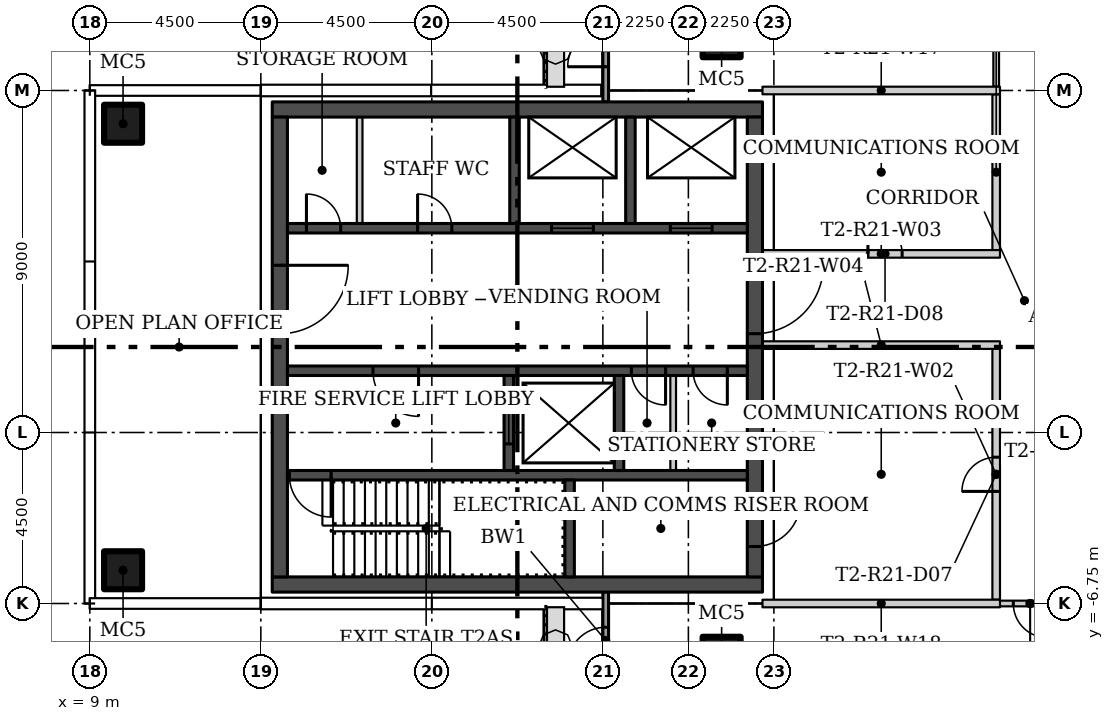
"""IFC4 building model, lengths in metres.
Left out: names, types, materials, properties, quantities, classifications, styles, units other than length and angle.
Written with IfcOpenShell. Run it as: python <this file> out.ifc"""

import sys

from ifc_helpers import new_model, si_unit, direction, frame, frame_2d, origin, origin_2d, place, context, subcontext, project, spatial, rectangle, hollow_rectangle, extrude, element, fill, save


model = new_model("IFC4")
c1 = context("Model", 3, precision=1e-05, world=origin(), true_north=direction((0.0, 1.0)))
c2 = subcontext(c1, "Body", "Model", "MODEL_VIEW")
j1 = project(units=[si_unit("LENGTHUNIT", "METRE"), si_unit("PLANEANGLEUNIT", "RADIAN")], contexts=[c1])
p1 = place(None, origin())
s1 = spatial("IfcSite", under=j1, at=p1, CompositionType="ELEMENT")
p2 = place(p1, origin())
s2 = spatial("IfcBuilding", under=s1, at=p2, CompositionType="ELEMENT")
p3 = place(p2, frame((0.0, 0.0, 194.4)))
s3 = spatial("IfcBuildingStorey", under=s2, at=p3, CompositionType="ELEMENT", Elevation=194.4)
for number, where in (
    (1, (25.625, 8.125, 0.0)),
    (2, (25.625, -8.125, 0.0)),
    (3, (9.875, -5.875, 0.0)),
    (4, (9.875, 5.875, 0.0)),
):
    element("IfcColumn", number, at=place(p3, frame(where)), inside=s3, PredefinedType="COLUMN", context=c2, shape_type="SweptSolid", body=[
        extrude(hollow_rectangle(XDim=1.0, YDim=1.0, WallThickness=0.04, at=origin_2d()), origin(), (0.0, 0.0, 1.0), 3.55),
    ])
p4 = place(p3, frame((32.85, 2.55, 0.0), z_axis=(0.0, 0.0, 1.0), x_axis=(0.0, 1.0, 0.0)))
e5 = element("IfcWall", 5, at=p4, inside=s3, PredefinedType="PARTITIONING", context=c2, shape_type="SweptSolid", body=[
    extrude(rectangle(XDim=4.1, YDim=0.2, at=frame_2d((2.05, 0.0))), origin(), (0.0, 0.0, 1.0), 3.55),
])
p5 = place(p3, frame((32.85, -6.65, 0.0), z_axis=(0.0, 0.0, 1.0), x_axis=(0.0, 1.0, 0.0)))
e6 = element("IfcWall", 6, at=p5, inside=s3, PredefinedType="PARTITIONING", context=c2, shape_type="SweptSolid", body=[
    extrude(rectangle(XDim=6.6, YDim=0.2, at=frame_2d((3.3, 0.0))), origin(), (0.0, 0.0, 1.0), 3.55),
])
p6 = place(p5, frame((2.85, 0.0, 0.0)))
e7 = element("IfcOpeningElement", 7, at=p6, cuts=e6, PredefinedType="OPENING", context=c2, shape_type="SweptSolid", body=[
    extrude(rectangle(XDim=0.9, YDim=2.1, at=frame_2d((0.45, 1.05))), frame((0.0, 0.11, 0.0), z_axis=(0.0, -1.0, 0.0), x_axis=(1.0, 0.0, 0.0)), (0.0, 0.0, 1.0), 0.22),
])
p7 = place(p3, frame((26.7, 2.45, 0.0)))
e8 = element("IfcWall", 8, at=p7, inside=s3, PredefinedType="PARTITIONING", context=c2, shape_type="SweptSolid", body=[
    extrude(rectangle(XDim=6.25, YDim=0.2, at=frame_2d((3.125, 0.0))), origin(), (0.0, 0.0, 1.0), 3.55),
])
p8 = place(p7, frame((2.775, 0.0, 0.0)))
e9 = element("IfcOpeningElement", 9, at=p8, cuts=e8, PredefinedType="OPENING", context=c2, shape_type="SweptSolid", body=[
    extrude(rectangle(XDim=0.9, YDim=2.1, at=frame_2d((0.45, 1.05))), frame((0.0, 0.11, 0.0), z_axis=(0.0, -1.0, 0.0), x_axis=(1.0, 0.0, 0.0)), (0.0, 0.0, 1.0), 0.22),
])
p9 = place(p3, frame((32.95, 0.05, 0.0), z_axis=(0.0, 0.0, 1.0), x_axis=(-1.0, 0.0, 0.0)))
e10 = element("IfcWall", 10, at=p9, inside=s3, PredefinedType="PARTITIONING", context=c2, shape_type="SweptSolid", body=[
    extrude(rectangle(XDim=6.25, YDim=0.2, at=frame_2d((3.125, 0.0))), origin(), (0.0, 0.0, 1.0), 3.55),
])
p10 = place(p3, frame((32.85, 6.85, 0.0), z_axis=(0.0, 0.0, 1.0), x_axis=(0.0, 1.0, 0.0)))
e11 = element("IfcWall", 11, at=p10, inside=s3, PredefinedType="PARTITIONING", context=c2, shape_type="SweptSolid", body=[
    extrude(rectangle(XDim=4.325, YDim=0.15, at=frame_2d((2.163, 0.0))), origin(), (0.0, 0.0, 1.0), 3.55),
])
p11 = place(p10, frame((1.7, 0.0, 0.0)))
e12 = element("IfcOpeningElement", 12, at=p11, cuts=e11, PredefinedType="OPENING", context=c2, shape_type="SweptSolid", body=[
    extrude(rectangle(XDim=0.9, YDim=2.1, at=frame_2d((0.45, 1.05))), frame((0.0, 0.085, 0.0), z_axis=(0.0, -1.0, 0.0), x_axis=(1.0, 0.0, 0.0)), (0.0, 0.0, 1.0), 0.17),
])
p12 = place(p3, frame((34.725, -6.75, 0.0), z_axis=(0.0, 0.0, 1.0), x_axis=(-1.0, 0.0, 0.0)))
e13 = element("IfcWall", 13, at=p12, inside=s3, PredefinedType="PARTITIONING", context=c2, shape_type="SweptSolid", body=[
    extrude(rectangle(XDim=1.976, YDim=0.15, at=frame_2d((0.988, 0.0))), origin(), (0.0, 0.0, 1.0), 3.55),
])
p13 = place(p12, frame((0.525, 0.0, 0.0)))
e14 = element("IfcOpeningElement", 14, at=p13, cuts=e13, PredefinedType="OPENING", context=c2, shape_type="SweptSolid", body=[
    extrude(rectangle(XDim=0.9, YDim=2.1, at=frame_2d((0.45, 1.05))), frame((0.0, 0.085, 0.0), z_axis=(0.0, -1.0, 0.0), x_axis=(1.0, 0.0, 0.0)), (0.0, 0.0, 1.0), 0.17),
])
p14 = place(p3, frame((32.95, 6.75, 0.0), z_axis=(0.0, 0.0, 1.0), x_axis=(-1.0, 0.0, 0.0)))
e15 = element("IfcWall", 15, at=p14, inside=s3, PredefinedType="PARTITIONING", context=c2, shape_type="SweptSolid", body=[
    extrude(rectangle(XDim=6.25, YDim=0.2, at=frame_2d((3.125, 0.0))), origin(), (0.0, 0.0, 1.0), 3.55),
])
p15 = place(p3, frame((26.7, -6.75, 0.0)))
e16 = element("IfcWall", 16, at=p15, inside=s3, PredefinedType="PARTITIONING", context=c2, shape_type="SweptSolid", body=[
    extrude(rectangle(XDim=6.25, YDim=0.2, at=frame_2d((3.125, 0.0))), origin(), (0.0, 0.0, 1.0), 3.55),
])
p16 = place(p3, frame((22.575, 6.448, 0.0), z_axis=(0.0, 0.0, 1.0), x_axis=(0.0, 1.0, 0.0)))
e17 = element("IfcWall", 17, at=p16, inside=s3, PredefinedType="SOLIDWALL", context=c2, shape_type="SweptSolid", body=[
    extrude(rectangle(XDim=2.552, YDim=0.15, at=frame_2d((1.276, 0.0))), origin(), (0.0, 0.0, 1.0), 3.45),
])
p17 = place(p16, frame((0.927, 0.0, 0.0)))
e18 = element("IfcOpeningElement", 18, at=p17, cuts=e17, PredefinedType="OPENING", context=c2, shape_type="SweptSolid", body=[
    extrude(rectangle(XDim=1.0, YDim=2.4, at=frame_2d((0.5, 1.2))), frame((0.0, 0.085, 0.0), z_axis=(0.0, -1.0, 0.0), x_axis=(1.0, 0.0, 0.0)), (0.0, 0.0, 1.0), 0.17),
])
p18 = place(p3, frame((22.575, -9.0, 0.0), z_axis=(0.0, 0.0, 1.0), x_axis=(0.0, 1.0, 0.0)))
e19 = element("IfcWall", 19, at=p18, inside=s3, PredefinedType="SOLIDWALL", context=c2, shape_type="SweptSolid", body=[
    extrude(rectangle(XDim=2.557, YDim=0.15, at=frame_2d((1.278, 0.0))), origin(), (0.0, 0.0, 1.0), 3.45),
])
p19 = place(p18, frame((0.625, 0.0, 0.0)))
e20 = element("IfcOpeningElement", 20, at=p19, cuts=e19, PredefinedType="OPENING", context=c2, shape_type="SweptSolid", body=[
    extrude(rectangle(XDim=1.0, YDim=2.4, at=frame_2d((0.5, 1.2))), frame((0.0, 0.085, 0.0), z_axis=(0.0, -1.0, 0.0), x_axis=(1.0, 0.0, 0.0)), (0.0, 0.0, 1.0), 0.17),
])
for number, where in (
    (21, (13.8, -6.25, 0.0)),
    (22, (13.8, 6.25, 0.0)),
):
    element("IfcWall", number, at=place(p3, frame(where)), inside=s3, PredefinedType="SHEAR", context=c2, shape_type="SweptSolid", body=[
        extrude(rectangle(XDim=12.9, YDim=0.4, at=frame_2d((6.45, 0.0))), origin(), (0.0, 0.0, 1.0), 3.55),
    ])
p20 = place(p3, frame((14.0, 6.05, 0.0), z_axis=(0.0, 0.0, 1.0), x_axis=(0.0, -1.0, 0.0)))
e23 = element("IfcWall", 23, at=p20, inside=s3, PredefinedType="SHEAR", context=c2, shape_type="SweptSolid", body=[
    extrude(rectangle(XDim=12.1, YDim=0.4, at=frame_2d((6.05, 0.0))), origin(), (0.0, 0.0, 1.0), 3.55),
])
p21 = place(p20, frame((3.9, 0.0, 0.0)))
e24 = element("IfcOpeningElement", 24, at=p21, cuts=e23, PredefinedType="OPENING", context=c2, shape_type="SweptSolid", body=[
    extrude(rectangle(XDim=1.8, YDim=2.4, at=frame_2d((0.9, 1.2))), frame((0.0, 0.21, 0.0), z_axis=(0.0, -1.0, 0.0), x_axis=(1.0, 0.0, 0.0)), (0.0, 0.0, 1.0), 0.42),
])
p22 = place(p3, frame((26.5, 6.05, 0.0), z_axis=(0.0, 0.0, 1.0), x_axis=(0.0, -1.0, 0.0)))
e25 = element("IfcWall", 25, at=p22, inside=s3, PredefinedType="SHEAR", context=c2, shape_type="SweptSolid", body=[
    extrude(rectangle(XDim=12.1, YDim=0.4, at=frame_2d((6.05, 0.0))), origin(), (0.0, 0.0, 1.0), 3.55),
])
p23 = place(p22, frame((10.1, 0.0, 0.0)))
e26 = element("IfcOpeningElement", 26, at=p23, cuts=e25, PredefinedType="OPENING", context=c2, shape_type="SweptSolid", body=[
    extrude(rectangle(XDim=1.2, YDim=2.1, at=frame_2d((0.6, 1.05))), frame((0.0, 0.21, 0.0), z_axis=(0.0, -1.0, 0.0), x_axis=(1.0, 0.0, 0.0)), (0.0, 0.0, 1.0), 0.42),
])
p24 = place(p22, frame((3.9, 0.0, 0.0)))
e27 = element("IfcOpeningElement", 27, at=p24, cuts=e25, PredefinedType="OPENING", context=c2, shape_type="SweptSolid", body=[
    extrude(rectangle(XDim=1.8, YDim=2.4, at=frame_2d((0.9, 1.2))), frame((0.0, 0.21, 0.0), z_axis=(0.0, -1.0, 0.0), x_axis=(1.0, 0.0, 0.0)), (0.0, 0.0, 1.0), 0.42),
])
p25 = place(p3, frame((26.3, -3.375, 0.0), z_axis=(0.0, 0.0, 1.0), x_axis=(-1.0, 0.0, 0.0)))
e28 = element("IfcWall", 28, at=p25, inside=s3, PredefinedType="SHEAR", context=c2, shape_type="SweptSolid", body=[
    extrude(rectangle(XDim=12.1, YDim=0.25, at=frame_2d((6.05, 0.0))), origin(), (0.0, 0.0, 1.0), 3.55),
])
p26 = place(p25, frame((10.95, 0.0, 0.0)))
e29 = element("IfcOpeningElement", 29, at=p26, cuts=e28, PredefinedType="OPENING", context=c2, shape_type="SweptSolid", body=[
    extrude(rectangle(XDim=1.1, YDim=2.1, at=frame_2d((0.55, 1.05))), frame((0.0, 0.135, 0.0), z_axis=(0.0, -1.0, 0.0), x_axis=(1.0, 0.0, 0.0)), (0.0, 0.0, 1.0), 0.27),
])
p27 = place(p3, frame((21.625, -6.05, 0.0), z_axis=(0.0, 0.0, 1.0), x_axis=(0.0, 1.0, 0.0)))
e30 = element("IfcWall", 30, at=p27, inside=s3, PredefinedType="SHEAR", context=c2, shape_type="SweptSolid", body=[
    extrude(rectangle(XDim=2.55, YDim=0.25, at=frame_2d((1.275, 0.0))), origin(), (0.0, 0.0, 1.0), 3.55),
])
p28 = place(p3, frame((26.3, -0.625, 0.0), z_axis=(0.0, 0.0, 1.0), x_axis=(-1.0, 0.0, 0.0)))
e31 = element("IfcWall", 31, at=p28, inside=s3, PredefinedType="SHEAR", context=c2, shape_type="SweptSolid", body=[
    extrude(rectangle(XDim=12.1, YDim=0.25, at=frame_2d((6.05, 0.0))), origin(), (0.0, 0.0, 1.0), 3.55),
])
p29 = place(p28, frame((8.65, 0.0, 0.0)))
e32 = element("IfcOpeningElement", 32, at=p29, cuts=e31, PredefinedType="OPENING", context=c2, shape_type="SweptSolid", body=[
    extrude(rectangle(XDim=1.2, YDim=2.1, at=frame_2d((0.6, 1.05))), frame((0.0, 0.135, 0.0), z_axis=(0.0, -1.0, 0.0), x_axis=(1.0, 0.0, 0.0)), (0.0, 0.0, 1.0), 0.27),
])
p30 = place(p28, frame((2.15, 0.0, 0.0)))
e33 = element("IfcOpeningElement", 33, at=p30, cuts=e31, PredefinedType="OPENING", context=c2, shape_type="SweptSolid", body=[
    extrude(rectangle(XDim=0.9, YDim=2.1, at=frame_2d((0.45, 1.05))), frame((0.0, 0.135, 0.0), z_axis=(0.0, -1.0, 0.0), x_axis=(1.0, 0.0, 0.0)), (0.0, 0.0, 1.0), 0.27),
])
p31 = place(p28, frame((0.525, 0.0, 0.0)))
e34 = element("IfcOpeningElement", 34, at=p31, cuts=e31, PredefinedType="OPENING", context=c2, shape_type="SweptSolid", body=[
    extrude(rectangle(XDim=0.9, YDim=2.1, at=frame_2d((0.45, 1.05))), frame((0.0, 0.135, 0.0), z_axis=(0.0, -1.0, 0.0), x_axis=(1.0, 0.0, 0.0)), (0.0, 0.0, 1.0), 0.27),
])
p32 = place(p3, frame((20.025, -3.25, 0.0), z_axis=(0.0, 0.0, 1.0), x_axis=(0.0, 1.0, 0.0)))
e35 = element("IfcWall", 35, at=p32, inside=s3, PredefinedType="SHEAR", context=c2, shape_type="SweptSolid", body=[
    extrude(rectangle(XDim=2.5, YDim=0.25, at=frame_2d((1.25, 0.0))), origin(), (0.0, 0.0, 1.0), 3.55),
])
p33 = place(p32, frame((0.7, 0.0, 0.0)))
e36 = element("IfcOpeningElement", 36, at=p33, cuts=e35, PredefinedType="OPENING", context=c2, shape_type="SweptSolid", body=[
    extrude(rectangle(XDim=1.1, YDim=2.1, at=frame_2d((0.55, 1.05))), frame((0.0, 0.135, 0.0), z_axis=(0.0, -1.0, 0.0), x_axis=(1.0, 0.0, 0.0)), (0.0, 0.0, 1.0), 0.27),
])
p34 = place(p3, frame((22.925, -3.25, 0.0), z_axis=(0.0, 0.0, 1.0), x_axis=(0.0, 1.0, 0.0)))
e37 = element("IfcWall", 37, at=p34, inside=s3, PredefinedType="SHEAR", context=c2, shape_type="SweptSolid", body=[
    extrude(rectangle(XDim=2.5, YDim=0.25, at=frame_2d((1.25, 0.0))), origin(), (0.0, 0.0, 1.0), 3.55),
])
p35 = place(p3, frame((24.35, -3.25, 0.0), z_axis=(0.0, 0.0, 1.0), x_axis=(0.0, 1.0, 0.0)))
e38 = element("IfcWall", 38, at=p35, inside=s3, PredefinedType="PARTITIONING", context=c2, shape_type="SweptSolid", body=[
    extrude(rectangle(XDim=2.5, YDim=0.15, at=frame_2d((1.25, 0.0))), origin(), (0.0, 0.0, 1.0), 3.55),
])
p36 = place(p3, frame((14.2, 3.125, 0.0)))
e39 = element("IfcWall", 39, at=p36, inside=s3, PredefinedType="SHEAR", context=c2, shape_type="SweptSolid", body=[
    extrude(rectangle(XDim=12.1, YDim=0.25, at=frame_2d((6.05, 0.0))), origin(), (0.0, 0.0, 1.0), 3.55),
])
p37 = place(p36, frame((6.95, 0.0, 0.0)))
e40 = element("IfcOpeningElement", 40, at=p37, cuts=e39, PredefinedType="OPENING", context=c2, shape_type="SweptSolid", body=[
    extrude(rectangle(XDim=1.1, YDim=2.1, at=frame_2d((0.55, 1.05))), frame((0.0, 0.135, 0.0), z_axis=(0.0, -1.0, 0.0), x_axis=(1.0, 0.0, 0.0)), (0.0, 0.0, 1.0), 0.27),
])
p38 = place(p36, frame((10.075, 0.0, 0.0)))
e41 = element("IfcOpeningElement", 41, at=p38, cuts=e39, PredefinedType="OPENING", context=c2, shape_type="SweptSolid", body=[
    extrude(rectangle(XDim=1.1, YDim=2.1, at=frame_2d((0.55, 1.05))), frame((0.0, 0.135, 0.0), z_axis=(0.0, -1.0, 0.0), x_axis=(1.0, 0.0, 0.0)), (0.0, 0.0, 1.0), 0.27),
])
p39 = place(p36, frame((0.5, 0.0, 0.0)))
e42 = element("IfcOpeningElement", 42, at=p39, cuts=e39, PredefinedType="OPENING", context=c2, shape_type="SweptSolid", body=[
    extrude(rectangle(XDim=0.9, YDim=2.1, at=frame_2d((0.45, 1.05))), frame((0.0, 0.135, 0.0), z_axis=(0.0, -1.0, 0.0), x_axis=(1.0, 0.0, 0.0)), (0.0, 0.0, 1.0), 0.27),
])
p40 = place(p36, frame((3.425, 0.0, 0.0)))
e43 = element("IfcOpeningElement", 43, at=p40, cuts=e39, PredefinedType="OPENING", context=c2, shape_type="SweptSolid", body=[
    extrude(rectangle(XDim=0.9, YDim=2.1, at=frame_2d((0.45, 1.05))), frame((0.0, 0.135, 0.0), z_axis=(0.0, -1.0, 0.0), x_axis=(1.0, 0.0, 0.0)), (0.0, 0.0, 1.0), 0.27),
])
for number, where, z_axis, x_axis in (
    (44, (20.175, 3.25, 0.0), (0.0, 0.0, 1.0), (0.0, 1.0, 0.0)),
    (45, (23.225, 3.25, 0.0), (0.0, 0.0, 1.0), (0.0, 1.0, 0.0)),
):
    element("IfcWall", number, at=place(p3, frame(where, z_axis=z_axis, x_axis=x_axis)), inside=s3, PredefinedType="SHEAR", context=c2, shape_type="SweptSolid", body=[
        extrude(rectangle(XDim=2.8, YDim=0.25, at=frame_2d((1.4, 0.0))), origin(), (0.0, 0.0, 1.0), 3.55),
    ])
p41 = place(p3, frame((16.1, 3.25, 0.0), z_axis=(0.0, 0.0, 1.0), x_axis=(0.0, 1.0, 0.0)))
e46 = element("IfcWall", 46, at=p41, inside=s3, PredefinedType="PARTITIONING", context=c2, shape_type="SweptSolid", body=[
    extrude(rectangle(XDim=2.8, YDim=0.15, at=frame_2d((1.4, 0.0))), origin(), (0.0, 0.0, 1.0), 3.55),
])
p42 = place(p13, origin())
e47 = element("IfcDoor", 47, at=p42, inside=s3, OperationType="SINGLE_SWING_LEFT", PredefinedType="DOOR", context=c2, shape_type="SweptSolid", body=[
    extrude(rectangle(XDim=0.9, YDim=2.1, at=frame_2d((0.45, 1.05))), frame((0.0, 0.025, 0.0), z_axis=(0.0, -1.0, 0.0), x_axis=(1.0, 0.0, 0.0)), (0.0, 0.0, 1.0), 0.05),
])
fill(e14, e47)
p43 = place(p6, origin())
e48 = element("IfcDoor", 48, at=p43, inside=s3, OperationType="SINGLE_SWING_LEFT", PredefinedType="DOOR", context=c2, shape_type="SweptSolid", body=[
    extrude(rectangle(XDim=0.9, YDim=2.1, at=frame_2d((0.45, 1.05))), frame((0.0, 0.025, 0.0), z_axis=(0.0, -1.0, 0.0), x_axis=(1.0, 0.0, 0.0)), (0.0, 0.0, 1.0), 0.05),
])
fill(e7, e48)
p44 = place(p8, origin())
e49 = element("IfcDoor", 49, at=p44, inside=s3, OperationType="SINGLE_SWING_RIGHT", PredefinedType="DOOR", context=c2, shape_type="SweptSolid", body=[
    extrude(rectangle(XDim=0.9, YDim=2.1, at=frame_2d((0.45, 1.05))), frame((0.0, 0.025, 0.0), z_axis=(0.0, -1.0, 0.0), x_axis=(1.0, 0.0, 0.0)), (0.0, 0.0, 1.0), 0.05),
])
fill(e9, e49)
p45 = place(p17, origin())
e50 = element("IfcDoor", 50, at=p45, inside=s3, OperationType="SINGLE_SWING_LEFT", PredefinedType="DOOR", context=c2, shape_type="SweptSolid", body=[
    extrude(rectangle(XDim=1.0, YDim=2.4, at=frame_2d((0.5, 1.2))), frame((0.0, 0.025, 0.0), z_axis=(0.0, -1.0, 0.0), x_axis=(1.0, 0.0, 0.0)), (0.0, 0.0, 1.0), 0.05),
])
fill(e18, e50)
p46 = place(p19, origin())
e51 = element("IfcDoor", 51, at=p46, inside=s3, OperationType="SINGLE_SWING_LEFT", PredefinedType="DOOR", context=c2, shape_type="SweptSolid", body=[
    extrude(rectangle(XDim=1.0, YDim=2.4, at=frame_2d((0.5, 1.2))), frame((0.0, 0.025, 0.0), z_axis=(0.0, -1.0, 0.0), x_axis=(1.0, 0.0, 0.0)), (0.0, 0.0, 1.0), 0.05),
])
fill(e20, e51)
p47 = place(p21, origin())
e52 = element("IfcDoor", 52, at=p47, inside=s3, OperationType="DOUBLE_DOOR_SINGLE_SWING", PredefinedType="DOOR", context=c2, shape_type="SweptSolid", body=[
    extrude(rectangle(XDim=1.8, YDim=2.4, at=frame_2d((0.9, 1.2))), frame((0.0, 0.025, 0.0), z_axis=(0.0, -1.0, 0.0), x_axis=(1.0, 0.0, 0.0)), (0.0, 0.0, 1.0), 0.05),
])
fill(e24, e52)
p48 = place(p23, origin())
e53 = element("IfcDoor", 53, at=p48, inside=s3, OperationType="SINGLE_SWING_RIGHT", PredefinedType="DOOR", context=c2, shape_type="SweptSolid", body=[
    extrude(rectangle(XDim=1.2, YDim=2.1, at=frame_2d((0.6, 1.05))), frame((0.0, 0.025, 0.0), z_axis=(0.0, -1.0, 0.0), x_axis=(1.0, 0.0, 0.0)), (0.0, 0.0, 1.0), 0.05),
])
fill(e26, e53)
p49 = place(p24, origin())
e54 = element("IfcDoor", 54, at=p49, inside=s3, OperationType="DOUBLE_DOOR_SINGLE_SWING", PredefinedType="DOOR", context=c2, shape_type="SweptSolid", body=[
    extrude(rectangle(XDim=1.8, YDim=2.4, at=frame_2d((0.9, 1.2))), frame((0.0, 0.025, 0.0), z_axis=(0.0, -1.0, 0.0), x_axis=(1.0, 0.0, 0.0)), (0.0, 0.0, 1.0), 0.05),
])
fill(e27, e54)
p50 = place(p26, origin())
e55 = element("IfcDoor", 55, at=p50, inside=s3, OperationType="SINGLE_SWING_RIGHT", PredefinedType="DOOR", context=c2, shape_type="SweptSolid", body=[
    extrude(rectangle(XDim=1.1, YDim=2.1, at=frame_2d((0.55, 1.05))), frame((0.0, 0.025, 0.0), z_axis=(0.0, -1.0, 0.0), x_axis=(1.0, 0.0, 0.0)), (0.0, 0.0, 1.0), 0.05),
])
fill(e29, e55)
p51 = place(p29, origin())
e56 = element("IfcDoor", 56, at=p51, inside=s3, OperationType="SINGLE_SWING_RIGHT", PredefinedType="DOOR", context=c2, shape_type="SweptSolid", body=[
    extrude(rectangle(XDim=1.2, YDim=2.1, at=frame_2d((0.6, 1.05))), frame((0.0, 0.025, 0.0), z_axis=(0.0, -1.0, 0.0), x_axis=(1.0, 0.0, 0.0)), (0.0, 0.0, 1.0), 0.05),
])
fill(e32, e56)
p52 = place(p30, origin())
e57 = element("IfcDoor", 57, at=p52, inside=s3, OperationType="SINGLE_SWING_LEFT", PredefinedType="DOOR", context=c2, shape_type="SweptSolid", body=[
    extrude(rectangle(XDim=0.9, YDim=2.1, at=frame_2d((0.45, 1.05))), frame((0.0, 0.025, 0.0), z_axis=(0.0, -1.0, 0.0), x_axis=(1.0, 0.0, 0.0)), (0.0, 0.0, 1.0), 0.05),
])
fill(e33, e57)
p53 = place(p31, origin())
e58 = element("IfcDoor", 58, at=p53, inside=s3, OperationType="SINGLE_SWING_LEFT", PredefinedType="DOOR", context=c2, shape_type="SweptSolid", body=[
    extrude(rectangle(XDim=0.9, YDim=2.1, at=frame_2d((0.45, 1.05))), frame((0.0, 0.025, 0.0), z_axis=(0.0, -1.0, 0.0), x_axis=(1.0, 0.0, 0.0)), (0.0, 0.0, 1.0), 0.05),
])
fill(e34, e58)
p54 = place(p33, origin())
e59 = element("IfcDoor", 59, at=p54, inside=s3, OperationType="SLIDING_TO_LEFT", PredefinedType="DOOR", context=c2, shape_type="SweptSolid", body=[
    extrude(rectangle(XDim=1.1, YDim=2.1, at=frame_2d((0.55, 1.05))), frame((0.0, 0.025, 0.0), z_axis=(0.0, -1.0, 0.0), x_axis=(1.0, 0.0, 0.0)), (0.0, 0.0, 1.0), 0.05),
])
fill(e36, e59)
p55 = place(p37, origin())
e60 = element("IfcDoor", 60, at=p55, inside=s3, OperationType="SLIDING_TO_LEFT", PredefinedType="DOOR", context=c2, shape_type="SweptSolid", body=[
    extrude(rectangle(XDim=1.1, YDim=2.1, at=frame_2d((0.55, 1.05))), frame((0.0, 0.025, 0.0), z_axis=(0.0, -1.0, 0.0), x_axis=(1.0, 0.0, 0.0)), (0.0, 0.0, 1.0), 0.05),
])
fill(e40, e60)
p56 = place(p38, origin())
e61 = element("IfcDoor", 61, at=p56, inside=s3, OperationType="SLIDING_TO_LEFT", PredefinedType="DOOR", context=c2, shape_type="SweptSolid", body=[
    extrude(rectangle(XDim=1.1, YDim=2.1, at=frame_2d((0.55, 1.05))), frame((0.0, 0.025, 0.0), z_axis=(0.0, -1.0, 0.0), x_axis=(1.0, 0.0, 0.0)), (0.0, 0.0, 1.0), 0.05),
])
fill(e41, e61)
p57 = place(p39, origin())
e62 = element("IfcDoor", 62, at=p57, inside=s3, OperationType="SINGLE_SWING_LEFT", PredefinedType="DOOR", context=c2, shape_type="SweptSolid", body=[
    extrude(rectangle(XDim=0.9, YDim=2.1, at=frame_2d((0.45, 1.05))), frame((0.0, 0.025, 0.0), z_axis=(0.0, -1.0, 0.0), x_axis=(1.0, 0.0, 0.0)), (0.0, 0.0, 1.0), 0.05),
])
fill(e42, e62)
p58 = place(p40, origin())
e63 = element("IfcDoor", 63, at=p58, inside=s3, OperationType="SINGLE_SWING_LEFT", PredefinedType="DOOR", context=c2, shape_type="SweptSolid", body=[
    extrude(rectangle(XDim=0.9, YDim=2.1, at=frame_2d((0.45, 1.05))), frame((0.0, 0.025, 0.0), z_axis=(0.0, -1.0, 0.0), x_axis=(1.0, 0.0, 0.0)), (0.0, 0.0, 1.0), 0.05),
])
fill(e43, e63)
save(model, sys.argv[1])
